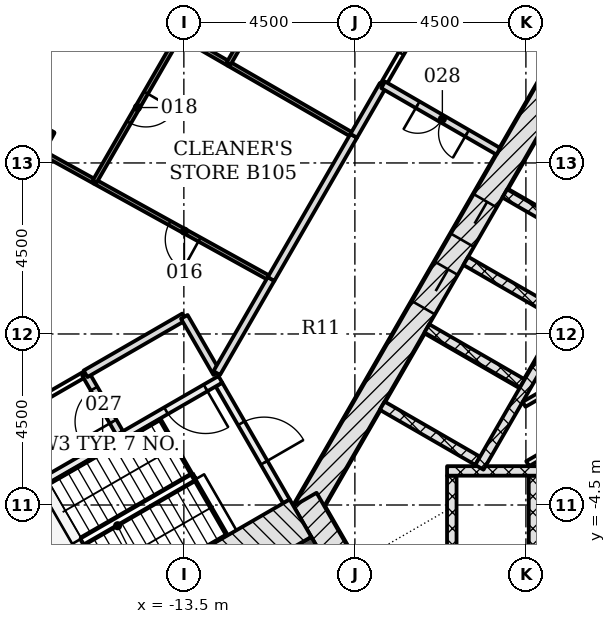
"""IFC4 building model, lengths in metres.
Left out: names, types, materials, properties, quantities, classifications, styles, units other than length and angle.
Written with IfcOpenShell. Run it as: python <this file> out.ifc"""

import sys

from ifc_helpers import new_model, si_unit, direction, frame, frame_2d, origin, origin_2d, place, context, subcontext, project, spatial, polyline, rectangle, outline, extrude, element, fill, save


model = new_model("IFC4")
c1 = context("Model", 3, precision=1e-05, world=origin(), true_north=direction((0.0, 1.0)))
c2 = subcontext(c1, "Body", "Model", "MODEL_VIEW")
j1 = project(units=[si_unit("LENGTHUNIT", "METRE"), si_unit("PLANEANGLEUNIT", "RADIAN")], contexts=[c1])
p1 = place(None, origin())
s1 = spatial("IfcSite", under=j1, at=p1, CompositionType="ELEMENT")
p2 = place(p1, origin())
s2 = spatial("IfcBuilding", under=s1, at=p2, CompositionType="ELEMENT")
p3 = place(p2, frame((0.0, 0.0, -4.5)))
s3 = spatial("IfcBuildingStorey", under=s2, at=p3, CompositionType="ELEMENT", Elevation=-4.5)
p4 = place(p3, frame((-17.739, 5.058, -0.3), z_axis=(0.0, 0.0, 1.0), x_axis=(-0.875152760281, 0.483846717641, 0.0)))
e1 = element("IfcColumn", 1, at=p4, inside=s3, PredefinedType="COLUMN", context=c2, shape_type="SweptSolid", body=[
    extrude(rectangle(XDim=1.2, YDim=1.2, at=origin_2d()), origin(), (0.0, 0.0, 1.0), 4.55),
])
p5 = place(p3, frame((-1.083, 11.281, -0.3), z_axis=(0.0, 0.0, 1.0), x_axis=(-0.500001446645, -0.866024568562, 0.0)))
e2 = element("IfcWall", 2, at=p5, inside=s3, PredefinedType="SHEAR", context=c2, shape_type="SweptSolid", body=[
    extrude(rectangle(XDim=18.458, YDim=0.7, at=frame_2d((9.229, 0.0))), origin(), (0.0, 0.0, 1.0), 4.55),
])
p6 = place(p5, frame((8.979, 0.0, 0.3)))
e3 = element("IfcOpeningElement", 3, at=p6, cuts=e2, PredefinedType="OPENING", context=c2, shape_type="SweptSolid", body=[
    extrude(rectangle(XDim=1.2, YDim=2.1, at=frame_2d((0.6, 1.05))), frame((0.0, 0.36, 0.0), z_axis=(0.0, -1.0, 0.0), x_axis=(1.0, 0.0, 0.0)), (0.0, 0.0, 1.0), 0.72),
])
p7 = place(p5, frame((11.029, 0.0, 0.3)))
e4 = element("IfcOpeningElement", 4, at=p7, cuts=e2, PredefinedType="OPENING", context=c2, shape_type="SweptSolid", body=[
    extrude(rectangle(XDim=1.2, YDim=2.1, at=frame_2d((0.6, 1.05))), frame((0.0, 0.36, 0.0), z_axis=(0.0, -1.0, 0.0), x_axis=(1.0, 0.0, 0.0)), (0.0, 0.0, 1.0), 0.72),
])
p8 = place(p3, frame((-10.311, -4.353, -0.3), z_axis=(0.0, 0.0, 1.0), x_axis=(0.500042739161, -0.866000726912, 0.0)))
e5 = element("IfcWall", 5, at=p8, inside=s3, PredefinedType="SHEAR", context=c2, shape_type="SweptSolid", body=[
    extrude(rectangle(XDim=2.771, YDim=0.7, at=frame_2d((1.386, 0.0))), origin(), (0.0, 0.0, 1.0), 4.55),
])
p9 = place(p3, frame((-9.922, -5.728, -0.3), z_axis=(0.0, 0.0, 1.0), x_axis=(-0.866028046028, -0.499995423472, 0.0)))
e6 = element("IfcWall", 6, at=p9, inside=s3, PredefinedType="SHEAR", context=c2, shape_type="SweptSolid", body=[
    extrude(rectangle(XDim=14.633, YDim=0.9, at=frame_2d((7.316, 0.0))), origin(), (0.0, 0.0, 1.0), 4.55),
])
p10 = place(p9, frame((7.35, 0.0, 0.3)))
e7 = element("IfcOpeningElement", 7, at=p10, cuts=e6, PredefinedType="OPENING", context=c2, shape_type="SweptSolid", body=[
    extrude(rectangle(XDim=1.5, YDim=2.1, at=frame_2d((0.75, 1.05))), frame((0.0, 0.46, 0.0), z_axis=(0.0, -1.0, 0.0), x_axis=(1.0, 0.0, 0.0)), (0.0, 0.0, 1.0), 0.92),
])
for number, where, z_axis, x_axis in (
    (8, (-6.45, -6.228, 0.0), (0.0, 0.0, 1.0), (0.0, 1.0, 0.0)),
    (9, (-4.3, -6.228, 0.0), (0.0, 0.0, 1.0), (0.0, 1.0, 0.0)),
):
    element("IfcWall", number, at=place(p3, frame(where, z_axis=z_axis, x_axis=x_axis)), inside=s3, PredefinedType="PARTITIONING", context=c2, shape_type="SweptSolid", body=[
        extrude(rectangle(XDim=2.5, YDim=0.25, at=frame_2d((1.25, 0.0))), origin(), (0.0, 0.0, 1.0), 4.25),
    ])
p11 = place(p3, frame((-6.575, -3.603, 0.0), z_axis=(0.0, 0.0, 1.0), x_axis=(1.0, 0.0, 0.0)))
e10 = element("IfcWall", 10, at=p11, inside=s3, PredefinedType="PARTITIONING", context=c2, shape_type="SweptSolid", body=[
    extrude(rectangle(XDim=13.15, YDim=0.25, at=frame_2d((6.575, 0.0))), origin(), (0.0, 0.0, 1.0), 4.25),
])
for number, where, z_axis, x_axis in (
    (11, (-5.056, 3.699, -0.3), (0.0, 0.0, 1.0), (0.866, -0.5, 0.0)),
    (12, (-6.081, 1.923, -0.3), (0.0, 0.0, 1.0), (0.866, -0.5, 0.0)),
    (13, (-7.106, 0.148, -0.3), (0.0, 0.0, 1.0), (0.866, -0.5, 0.0)),
):
    element("IfcWall", number, at=place(p3, frame(where, z_axis=z_axis, x_axis=x_axis)), inside=s3, PredefinedType="PARTITIONING", context=c2, shape_type="SweptSolid", body=[
        extrude(rectangle(XDim=2.9, YDim=0.25, at=frame_2d((1.45, 0.0))), origin(), (0.0, 0.0, 1.0), 4.55),
    ])
p12 = place(p3, frame((-8.281, -1.887, 0.0), z_axis=(0.0, 0.0, 1.0), x_axis=(0.866032775405, -0.499987231761, 0.0)))
e14 = element("IfcWall", 14, at=p12, inside=s3, PredefinedType="PARTITIONING", context=c2, shape_type="SweptSolid", body=[
    extrude(rectangle(XDim=2.9, YDim=0.25, at=frame_2d((1.45, 0.0))), origin(), (0.0, 0.0, 1.0), 4.25),
])
p13 = place(p3, frame((0.176, 6.711, 0.0), z_axis=(0.0, 0.0, 1.0), x_axis=(-0.500004227369, -0.866022963098, 0.0)))
e15 = element("IfcWall", 15, at=p13, inside=s3, PredefinedType="PARTITIONING", context=c2, shape_type="SweptSolid", body=[
    extrude(rectangle(XDim=11.8, YDim=0.25, at=frame_2d((5.9, 0.0))), origin(), (0.0, 0.0, 1.0), 4.25),
])
p14 = place(p3, frame((-4.548, -1.851, 0.0), z_axis=(0.0, 0.0, 1.0), x_axis=(0.866023939251, 0.500002536638, 0.0)))
e16 = element("IfcWall", 16, at=p14, inside=s3, PredefinedType="PARTITIONING", context=c2, shape_type="SweptSolid", body=[
    extrude(rectangle(XDim=11.092, YDim=0.15, at=frame_2d((5.546, 0.0))), origin(), (0.0, 0.0, 1.0), 4.25),
])
p15 = place(p14, frame((3.497, 0.0, 0.0)))
e17 = element("IfcOpeningElement", 17, at=p15, cuts=e16, PredefinedType="OPENING", context=c2, shape_type="SweptSolid", body=[
    extrude(rectangle(XDim=0.9, YDim=2.1, at=frame_2d((0.45, 1.05))), frame((0.0, 0.085, 0.0), z_axis=(0.0, -1.0, 0.0), x_axis=(1.0, 0.0, 0.0)), (0.0, 0.0, 1.0), 0.17),
])
p16 = place(p3, frame((-4.454, -3.413, 0.0), z_axis=(0.0, 0.0, 1.0), x_axis=(0.86603043987, 0.499991277142, 0.0)))
e18 = element("IfcWall", 18, at=p16, inside=s3, PredefinedType="PARTITIONING", context=c2, shape_type="SweptSolid", body=[
    extrude(rectangle(XDim=11.792, YDim=0.15, at=frame_2d((5.896, 0.0))), origin(), (0.0, 0.0, 1.0), 4.25),
])
p17 = place(p16, frame((3.847, 0.0, 0.0)))
e19 = element("IfcOpeningElement", 19, at=p17, cuts=e18, PredefinedType="OPENING", context=c2, shape_type="SweptSolid", body=[
    extrude(rectangle(XDim=0.9, YDim=2.1, at=frame_2d((0.45, 1.05))), frame((0.0, 0.085, 0.0), z_axis=(0.0, -1.0, 0.0), x_axis=(1.0, 0.0, 0.0)), (0.0, 0.0, 1.0), 0.17),
])
p18 = place(p3, frame((-12.576, -1.331, -0.3), z_axis=(0.0, 0.0, 1.0), x_axis=(0.499970499736, -0.8660424351, 0.0)))
e20 = element("IfcWall", 20, at=p18, inside=s3, PredefinedType="SHEAR", context=c2, shape_type="SweptSolid", body=[
    extrude(rectangle(XDim=3.55, YDim=0.2, at=frame_2d((1.775, 0.0))), origin(), (0.0, 0.0, 1.0), 4.55),
])
p19 = place(p18, frame((1.175, 0.0, 0.3)))
e21 = element("IfcOpeningElement", 21, at=p19, cuts=e20, PredefinedType="OPENING", context=c2, shape_type="SweptSolid", body=[
    extrude(rectangle(XDim=1.2, YDim=2.1, at=frame_2d((0.6, 1.05))), frame((0.0, 0.11, 0.0), z_axis=(0.0, -1.0, 0.0), x_axis=(1.0, 0.0, 0.0)), (0.0, 0.0, 1.0), 0.22),
])
p20 = place(p3, frame((-12.539, -1.194, -0.3), z_axis=(0.0, 0.0, 1.0), x_axis=(-0.866045472092, -0.499965239061, 0.0)))
e22 = element("IfcWall", 22, at=p20, inside=s3, PredefinedType="SHEAR", context=c2, shape_type="SweptSolid", body=[
    extrude(rectangle(XDim=5.6, YDim=0.2, at=frame_2d((2.8, 0.0))), origin(), (0.0, 0.0, 1.0), 4.55),
])
p21 = place(p20, frame((0.45, 0.0, 0.3)))
e23 = element("IfcOpeningElement", 23, at=p21, cuts=e22, PredefinedType="OPENING", context=c2, shape_type="SweptSolid", body=[
    extrude(rectangle(XDim=1.2, YDim=2.1, at=frame_2d((0.6, 1.05))), frame((0.0, 0.11, 0.0), z_axis=(0.0, -1.0, 0.0), x_axis=(1.0, 0.0, 0.0)), (0.0, 0.0, 1.0), 0.22),
])
p22 = place(p3, frame((-10.43, -4.847, -0.3), z_axis=(0.0, 0.0, 1.0), x_axis=(-0.866018442252, -0.500012057535, 0.0)))
e24 = element("IfcWall", 24, at=p22, inside=s3, PredefinedType="SHEAR", context=c2, shape_type="SweptSolid", body=[
    extrude(rectangle(XDim=7.2, YDim=1.136, at=frame_2d((3.6, 0.0))), origin(), (0.0, 0.0, 1.0), 4.55),
])
p23 = place(p3, frame((0.0, 0.0, -0.3)))
e25 = element("IfcWall", 25, at=p23, inside=s3, PredefinedType="SHEAR", context=c2, shape_type="SweptSolid", body=[
    extrude(outline(polyline([(-17.439, -3.907), (-18.025, -6.093), (-16.95, -7.955), (-16.777, -7.855), (-17.81, -6.065), (-17.267, -4.039), (-17.339, -4.081), (-17.339, -4.081), (-17.339, -4.081), (-17.339, -4.081), (-17.339, -4.081), (-17.339, -4.081), (-17.339, -4.081), (-17.339, -4.081), (-17.339, -4.081), (-17.339, -4.081), (-17.339, -4.081), (-17.339, -4.081), (-17.339, -4.081), (-17.339, -4.081), (-17.339, -4.081), (-17.339, -4.081), (-17.339, -4.081), (-17.439, -3.907)])), origin(), (0.0, 0.0, 1.0), 4.55),
])
p24 = place(p3, frame((-16.087, -1.049, 0.0), z_axis=(0.0, 0.0, 1.0), x_axis=(-0.866071706002, -0.49991979363, 0.0)))
e26 = element("IfcWall", 26, at=p24, inside=s3, PredefinedType="PARTITIONING", context=c2, shape_type="SweptSolid", body=[
    extrude(rectangle(XDim=5.105, YDim=0.15, at=frame_2d((2.552, 0.0))), origin(), (0.0, 0.0, 1.0), 3.638),
])
p25 = place(p24, frame((1.65, 0.0, 0.0)))
e27 = element("IfcOpeningElement", 27, at=p25, cuts=e26, PredefinedType="OPENING", context=c2, shape_type="SweptSolid", body=[
    extrude(rectangle(XDim=1.8, YDim=2.1, at=frame_2d((0.9, 1.05))), frame((0.0, 0.085, 0.0), z_axis=(0.0, -1.0, 0.0), x_axis=(1.0, 0.0, 0.0)), (0.0, 0.0, 1.0), 0.17),
])
p26 = place(p3, frame((-15.188, -2.607, 0.0), z_axis=(0.0, 0.0, 1.0), x_axis=(-0.500024172624, 0.866011447264, 0.0)))
e28 = element("IfcWall", 28, at=p26, inside=s3, PredefinedType="PARTITIONING", context=c2, shape_type="SweptSolid", body=[
    extrude(rectangle(XDim=1.798, YDim=0.2, at=frame_2d((0.899, 0.0))), origin(), (0.0, 0.0, 1.0), 3.638),
])
p27 = place(p26, frame((0.35, 0.0, 0.0)))
e29 = element("IfcOpeningElement", 29, at=p27, cuts=e28, PredefinedType="OPENING", context=c2, shape_type="SweptSolid", body=[
    extrude(rectangle(XDim=1.0, YDim=2.1, at=frame_2d((0.5, 1.05))), frame((0.0, 0.11, 0.0), z_axis=(0.0, -1.0, 0.0), x_axis=(1.0, 0.0, 0.0)), (0.0, 0.0, 1.0), 0.22),
])
p28 = place(p3, frame((-16.087, -1.048, 0.0), z_axis=(0.0, 0.0, 1.0), x_axis=(0.865988915629, 0.500063194015, 0.0)))
e30 = element("IfcWall", 30, at=p28, inside=s3, PredefinedType="PARTITIONING", context=c2, shape_type="SweptSolid", body=[
    extrude(rectangle(XDim=2.998, YDim=0.2, at=frame_2d((1.499, 0.0))), origin(), (0.0, 0.0, 1.0), 3.638),
])
p29 = place(p3, frame((-13.489, 0.451, 0.0), z_axis=(0.0, 0.0, 1.0), x_axis=(0.500044178772, -0.865999895656, 0.0)))
e31 = element("IfcWall", 31, at=p29, inside=s3, PredefinedType="PARTITIONING", context=c2, shape_type="SweptSolid", body=[
    extrude(rectangle(XDim=1.708, YDim=0.2, at=frame_2d((0.854, 0.0))), origin(), (0.0, 0.0, 1.0), 4.25),
])
p30 = place(p3, frame((-12.635, -1.028, 0.0), z_axis=(0.0, 0.0, 1.0), x_axis=(0.50005725472, 0.865992345233, 0.0)))
e32 = element("IfcWall", 32, at=p30, inside=s3, PredefinedType="PARTITIONING", context=c2, shape_type="SweptSolid", body=[
    extrude(rectangle(XDim=2.862, YDim=0.2, at=frame_2d((1.431, 0.0))), origin(), (0.0, 0.0, 1.0), 3.638),
])
p31 = place(p3, frame((-11.208, 1.446, 0.0), z_axis=(0.0, 0.0, 1.0), x_axis=(-0.875127041283, 0.483893233694, 0.0)))
e33 = element("IfcWall", 33, at=p31, inside=s3, PredefinedType="PARTITIONING", context=c2, shape_type="SweptSolid", body=[
    extrude(rectangle(XDim=5.299, YDim=0.12, at=frame_2d((2.649, 0.0))), origin(), (0.0, 0.0, 1.0), 3.638),
])
p32 = place(p31, frame((2.15, 0.0, 0.0)))
e34 = element("IfcOpeningElement", 34, at=p32, cuts=e33, PredefinedType="OPENING", context=c2, shape_type="SweptSolid", body=[
    extrude(rectangle(XDim=0.9, YDim=2.1, at=frame_2d((0.45, 1.05))), frame((0.0, 0.07, 0.0), z_axis=(0.0, -1.0, 0.0), x_axis=(1.0, 0.0, 0.0)), (0.0, 0.0, 1.0), 0.14),
])
p33 = place(p3, frame((-15.848, 4.012, 0.0), z_axis=(0.0, 0.0, 1.0), x_axis=(-0.87521017078, 0.483742862442, 0.0)))
e35 = element("IfcWall", 35, at=p33, inside=s3, PredefinedType="PARTITIONING", context=c2, shape_type="SweptSolid", body=[
    extrude(rectangle(XDim=1.561, YDim=0.12, at=frame_2d((0.781, 0.0))), origin(), (0.0, 0.0, 1.0), 3.638),
])
p34 = place(p3, frame((-9.031, 5.213, 0.0), z_axis=(0.0, 0.0, 1.0), x_axis=(-0.500044734646, -0.865999574684, 0.0)))
e36 = element("IfcWall", 36, at=p34, inside=s3, PredefinedType="PARTITIONING", context=c2, shape_type="SweptSolid", body=[
    extrude(rectangle(XDim=4.35, YDim=0.2, at=frame_2d((2.175, 0.0))), origin(), (0.0, 0.0, 1.0), 3.638),
])
p35 = place(p3, frame((-8.256, 6.555, 0.0), z_axis=(0.0, 0.0, 1.0), x_axis=(-0.500177701192, -0.865922783642, 0.0)))
e37 = element("IfcWall", 37, at=p35, inside=s3, PredefinedType="PARTITIONING", context=c2, shape_type="SweptSolid", body=[
    extrude(rectangle(XDim=1.547, YDim=0.2, at=frame_2d((0.774, 0.0))), origin(), (0.0, 0.0, 1.0), 3.638),
])
p36 = place(p3, frame((-5.226, 4.806, 0.0), z_axis=(0.0, 0.0, 1.0), x_axis=(-0.865949687125, 0.500131122175, 0.0)))
e38 = element("IfcWall", 38, at=p36, inside=s3, PredefinedType="PARTITIONING", context=c2, shape_type="SweptSolid", body=[
    extrude(rectangle(XDim=3.499, YDim=0.2, at=frame_2d((1.75, 0.0))), origin(), (0.0, 0.0, 1.0), 4.25),
])
p37 = place(p36, frame((0.95, 0.0, 0.0)))
e39 = element("IfcOpeningElement", 39, at=p37, cuts=e38, PredefinedType="OPENING", context=c2, shape_type="SweptSolid", body=[
    extrude(rectangle(XDim=1.5, YDim=2.1, at=frame_2d((0.75, 1.05))), frame((0.0, 0.11, 0.0), z_axis=(0.0, -1.0, 0.0), x_axis=(1.0, 0.0, 0.0)), (0.0, 0.0, 1.0), 0.22),
])
p38 = place(p3, frame((-13.621, 7.863, 0.0), z_axis=(0.0, 0.0, 1.0), x_axis=(-0.500241930066, -0.865885680332, 0.0)))
e40 = element("IfcWall", 40, at=p38, inside=s3, PredefinedType="PARTITIONING", context=c2, shape_type="SweptSolid", body=[
    extrude(rectangle(XDim=4.448, YDim=0.12, at=frame_2d((2.224, 0.0))), origin(), (0.0, 0.0, 1.0), 3.638),
])
p39 = place(p38, frame((1.75, 0.0, 0.0)))
e41 = element("IfcOpeningElement", 41, at=p39, cuts=e40, PredefinedType="OPENING", context=c2, shape_type="SweptSolid", body=[
    extrude(rectangle(XDim=0.9, YDim=2.1, at=frame_2d((0.45, 1.05))), frame((0.0, 0.07, 0.0), z_axis=(0.0, -1.0, 0.0), x_axis=(1.0, 0.0, 0.0)), (0.0, 0.0, 1.0), 0.14),
])
p40 = place(p3, frame((-9.032, 5.215, 0.0), z_axis=(0.0, 0.0, 1.0), x_axis=(-0.866138487245, 0.49980408253, 0.0)))
e42 = element("IfcWall", 42, at=p40, inside=s3, PredefinedType="PARTITIONING", context=c2, shape_type="SweptSolid", body=[
    extrude(rectangle(XDim=3.797, YDim=0.12, at=frame_2d((1.899, 0.0))), origin(), (0.0, 0.0, 1.0), 3.638),
])
p41 = place(p3, frame((-12.324, 7.115, 0.0), z_axis=(0.0, 0.0, 1.0), x_axis=(-0.865912029007, 0.500196319479, 0.0)))
e43 = element("IfcWall", 43, at=p41, inside=s3, PredefinedType="PARTITIONING", context=c2, shape_type="SweptSolid", body=[
    extrude(rectangle(XDim=1.501, YDim=0.12, at=frame_2d((0.751, 0.0))), origin(), (0.0, 0.0, 1.0), 3.638),
])
p42 = place(p3, frame((-10.112, 10.942, 0.0), z_axis=(0.0, 0.0, 1.0), x_axis=(-0.500084296963, -0.86597672944, 0.0)))
e44 = element("IfcWall", 44, at=p42, inside=s3, PredefinedType="PARTITIONING", context=c2, shape_type="SweptSolid", body=[
    extrude(rectangle(XDim=4.419, YDim=0.12, at=frame_2d((2.209, 0.0))), origin(), (0.0, 0.0, 1.0), 3.638),
])
p43 = place(p42, frame((1.75, 0.0, 0.0)))
e45 = element("IfcOpeningElement", 45, at=p43, cuts=e44, PredefinedType="OPENING", context=c2, shape_type="SweptSolid", body=[
    extrude(rectangle(XDim=0.9, YDim=2.1, at=frame_2d((0.45, 1.05))), frame((0.0, 0.07, 0.0), z_axis=(0.0, -1.0, 0.0), x_axis=(1.0, 0.0, 0.0)), (0.0, 0.0, 1.0), 0.14),
])
p44 = place(p3, frame((-8.256, 6.558, 0.0), z_axis=(0.0, 0.0, 1.0), x_axis=(0.500081734942, 0.86597820895, 0.0)))
e46 = element("IfcWall", 46, at=p44, inside=s3, PredefinedType="PARTITIONING", context=c2, shape_type="SweptSolid", body=[
    extrude(rectangle(XDim=2.804, YDim=0.15, at=frame_2d((1.402, 0.0))), origin(), (0.0, 0.0, 1.0), 3.638),
])
p45 = place(p44, frame((0.95, 0.0, 0.0)))
e47 = element("IfcOpeningElement", 47, at=p45, cuts=e46, PredefinedType="OPENING", context=c2, shape_type="SweptSolid", body=[
    extrude(rectangle(XDim=0.9, YDim=2.1, at=frame_2d((0.45, 1.05))), frame((0.0, 0.085, 0.0), z_axis=(0.0, -1.0, 0.0), x_axis=(1.0, 0.0, 0.0)), (0.0, 0.0, 1.0), 0.17),
])
p46 = place(p6, origin())
e48 = element("IfcDoor", 48, at=p46, inside=s3, OperationType="DOUBLE_DOOR_SLIDING", PredefinedType="DOOR", context=c2, shape_type="SweptSolid", body=[
    extrude(rectangle(XDim=1.2, YDim=2.1, at=frame_2d((0.6, 1.05))), frame((0.0, 0.025, 0.0), z_axis=(0.0, -1.0, 0.0), x_axis=(1.0, 0.0, 0.0)), (0.0, 0.0, 1.0), 0.05),
])
fill(e3, e48)
p47 = place(p7, origin())
e49 = element("IfcDoor", 49, at=p47, inside=s3, OperationType="DOUBLE_DOOR_SLIDING", PredefinedType="DOOR", context=c2, shape_type="SweptSolid", body=[
    extrude(rectangle(XDim=1.2, YDim=2.1, at=frame_2d((0.6, 1.05))), frame((0.0, 0.025, 0.0), z_axis=(0.0, -1.0, 0.0), x_axis=(1.0, 0.0, 0.0)), (0.0, 0.0, 1.0), 0.05),
])
fill(e4, e49)
p48 = place(p19, origin())
e50 = element("IfcDoor", 50, at=p48, inside=s3, OperationType="SINGLE_SWING_RIGHT", PredefinedType="DOOR", context=c2, shape_type="SweptSolid", body=[
    extrude(rectangle(XDim=1.2, YDim=2.1, at=frame_2d((0.6, 1.05))), frame((0.0, 0.025, 0.0), z_axis=(0.0, -1.0, 0.0), x_axis=(1.0, 0.0, 0.0)), (0.0, 0.0, 1.0), 0.05),
])
fill(e21, e50)
p49 = place(p21, origin())
e51 = element("IfcDoor", 51, at=p49, inside=s3, OperationType="SINGLE_SWING_LEFT", PredefinedType="DOOR", context=c2, shape_type="SweptSolid", body=[
    extrude(rectangle(XDim=1.2, YDim=2.1, at=frame_2d((0.6, 1.05))), frame((0.0, 0.025, 0.0), z_axis=(0.0, -1.0, 0.0), x_axis=(1.0, 0.0, 0.0)), (0.0, 0.0, 1.0), 0.05),
])
fill(e23, e51)
p50 = place(p32, origin())
e52 = element("IfcDoor", 52, at=p50, inside=s3, OperationType="SINGLE_SWING_RIGHT", PredefinedType="DOOR", context=c2, shape_type="SweptSolid", body=[
    extrude(rectangle(XDim=0.9, YDim=2.1, at=frame_2d((0.45, 1.05))), frame((0.0, 0.025, 0.0), z_axis=(0.0, -1.0, 0.0), x_axis=(1.0, 0.0, 0.0)), (0.0, 0.0, 1.0), 0.05),
])
fill(e34, e52)
p51 = place(p39, origin())
e53 = element("IfcDoor", 53, at=p51, inside=s3, OperationType="SINGLE_SWING_RIGHT", PredefinedType="DOOR", context=c2, shape_type="SweptSolid", body=[
    extrude(rectangle(XDim=0.9, YDim=2.1, at=frame_2d((0.45, 1.05))), frame((0.0, 0.025, 0.0), z_axis=(0.0, -1.0, 0.0), x_axis=(1.0, 0.0, 0.0)), (0.0, 0.0, 1.0), 0.05),
])
fill(e41, e53)
p52 = place(p45, origin())
e54 = element("IfcDoor", 54, at=p52, inside=s3, OperationType="SINGLE_SWING_LEFT", PredefinedType="DOOR", context=c2, shape_type="SweptSolid", body=[
    extrude(rectangle(XDim=0.9, YDim=2.1, at=frame_2d((0.45, 1.05))), frame((0.0, 0.025, 0.0), z_axis=(0.0, -1.0, 0.0), x_axis=(1.0, 0.0, 0.0)), (0.0, 0.0, 1.0), 0.05),
])
fill(e47, e54)
p53 = place(p27, origin())
e55 = element("IfcDoor", 55, at=p53, inside=s3, OperationType="SINGLE_SWING_LEFT", PredefinedType="DOOR", context=c2, shape_type="SweptSolid", body=[
    extrude(rectangle(XDim=1.0, YDim=2.1, at=frame_2d((0.5, 1.05))), frame((0.0, 0.025, 0.0), z_axis=(0.0, -1.0, 0.0), x_axis=(1.0, 0.0, 0.0)), (0.0, 0.0, 1.0), 0.05),
])
fill(e29, e55)
p54 = place(p37, origin())
e56 = element("IfcDoor", 56, at=p54, inside=s3, OperationType="DOUBLE_DOOR_SINGLE_SWING", PredefinedType="DOOR", context=c2, shape_type="SweptSolid", body=[
    extrude(rectangle(XDim=1.5, YDim=2.1, at=frame_2d((0.75, 1.05))), frame((0.0, 0.025, 0.0), z_axis=(0.0, -1.0, 0.0), x_axis=(1.0, 0.0, 0.0)), (0.0, 0.0, 1.0), 0.05),
])
fill(e39, e56)
save(model, sys.argv[1])
